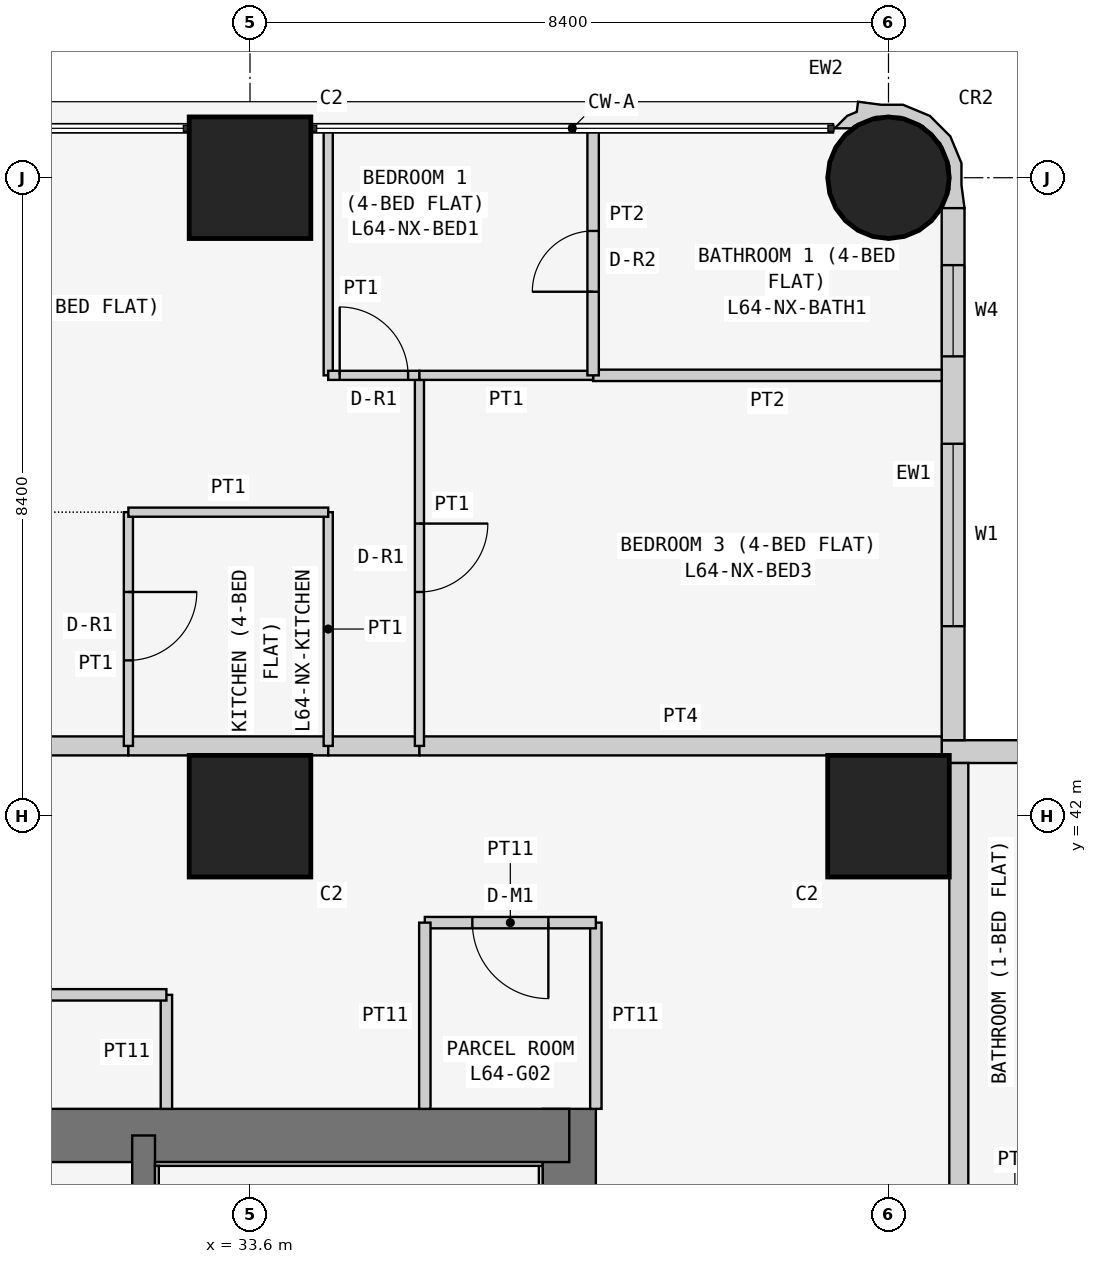
"""IFC4 building model, lengths in metres.
Left out: names, types, materials, properties, quantities, classifications, styles, units other than length and angle.
Written with IfcOpenShell. Run it as: python <this file> out.ifc"""

import sys

from ifc_helpers import new_model, si_unit, direction, frame, frame_2d, origin, origin_2d, place, context, subcontext, project, spatial, polyline, rectangle, circle, outline, extrude, element, fill, save


model = new_model("IFC4")
c1 = context("Model", 3, precision=1e-05, world=origin(), true_north=direction((0.0, 1.0)))
c2 = subcontext(c1, "Body", "Model", "MODEL_VIEW")
j1 = project(units=[si_unit("LENGTHUNIT", "METRE"), si_unit("PLANEANGLEUNIT", "RADIAN")], contexts=[c1])
p1 = place(None, origin())
s1 = spatial("IfcSite", under=j1, at=p1, CompositionType="ELEMENT")
p2 = place(p1, origin())
s2 = spatial("IfcBuilding", under=s1, at=p2, CompositionType="ELEMENT")
p3 = place(p2, frame((0.0, 0.0, 244.5)))
s3 = spatial("IfcBuildingStorey", under=s2, at=p3, CompositionType="ELEMENT", Elevation=244.5)
for number, where, z_axis, x_axis in (
    (1, (33.6, 42.0, 0.0), (0.0, 0.0, 1.0), (1.0, 0.0, 0.0)),
    (2, (33.6, 50.4, 0.0), (0.0, 0.0, 1.0), (1.0, 0.0, 0.0)),
    (3, (42.0, 42.0, 0.0), (0.0, 0.0, 1.0), (1.0, 0.0, 0.0)),
):
    element("IfcColumn", number, at=place(p3, frame(where, z_axis=z_axis, x_axis=x_axis)), inside=s3, PredefinedType="COLUMN", context=c2, shape_type="SweptSolid", body=[
        extrude(rectangle(XDim=1.6, YDim=1.6, at=origin_2d()), origin(), (0.0, 0.0, 1.0), 3.6),
    ])
p4 = place(p3, frame((42.0, 50.4, 0.0), z_axis=(0.0, 0.0, 1.0), x_axis=(1.0, 0.0, 0.0)))
e4 = element("IfcColumn", 4, at=p4, inside=s3, PredefinedType="COLUMN", context=c2, shape_type="SweptSolid", body=[
    extrude(circle(Radius=0.8, at=origin_2d()), origin(), (0.0, 0.0, 1.0), 3.6),
])
p5 = place(p3, frame((37.8, 21.0, 0.0), z_axis=(0.0, 0.0, 1.0), x_axis=(0.0, 1.0, 0.0)))
e5 = element("IfcWall", 5, at=p5, inside=s3, PredefinedType="SHEAR", context=c2, shape_type="SweptSolid", body=[
    extrude(rectangle(XDim=17.15, YDim=0.7, at=frame_2d((8.575, 0.0))), origin(), (0.0, 0.0, 1.0), 3.6),
])
p6 = place(p5, frame((5.2, 0.0, 0.0)))
e6 = element("IfcOpeningElement", 6, at=p6, cuts=e5, PredefinedType="OPENING", context=c2, shape_type="SweptSolid", body=[
    extrude(rectangle(XDim=1.2, YDim=2.1, at=frame_2d((0.6, 1.05))), frame((0.0, 0.36, 0.0), z_axis=(0.0, -1.0, 0.0), x_axis=(1.0, 0.0, 0.0)), (0.0, 0.0, 1.0), 0.72),
])
p7 = place(p3, frame((37.8, 37.8, 0.0), z_axis=(0.0, 0.0, 1.0), x_axis=(-1.0, 0.0, 0.0)))
e7 = element("IfcWall", 7, at=p7, inside=s3, PredefinedType="SHEAR", context=c2, shape_type="SweptSolid", body=[
    extrude(rectangle(XDim=17.15, YDim=0.7, at=frame_2d((8.575, 0.0))), origin(), (0.0, 0.0, 1.0), 3.6),
])
p8 = place(p3, frame((32.2, 29.25, 0.0), z_axis=(0.0, 0.0, 1.0), x_axis=(0.0, 1.0, 0.0)))
e8 = element("IfcWall", 8, at=p8, inside=s3, PredefinedType="SHEAR", context=c2, shape_type="SweptSolid", body=[
    extrude(rectangle(XDim=8.55, YDim=0.3, at=frame_2d((4.275, 0.0))), origin(), (0.0, 0.0, 1.0), 3.6),
])
p9 = place(p3, frame((50.0, 42.85, 0.0), z_axis=(0.0, 0.0, 1.0), x_axis=(-1.0, 0.0, 0.0)))
e9 = element("IfcWall", 9, at=p9, inside=s3, PredefinedType="SOLIDWALL", context=c2, shape_type="SweptSolid", body=[
    extrude(rectangle(XDim=7.3, YDim=0.3, at=frame_2d((3.65, 0.0))), origin(), (0.0, 0.0, 1.0), 3.35),
])
p10 = place(p9, frame((3.1, 0.0, 0.9)))
e10 = element("IfcOpeningElement", 10, at=p10, cuts=e9, PredefinedType="OPENING", context=c2, shape_type="SweptSolid", body=[
    extrude(rectangle(XDim=2.4, YDim=1.5, at=frame_2d((1.2, 0.75))), frame((0.0, 0.16, 0.0), z_axis=(0.0, -1.0, 0.0), x_axis=(1.0, 0.0, 0.0)), (0.0, 0.0, 1.0), 0.32),
])
p11 = place(p9, frame((0.75, 0.0, 0.9)))
e11 = element("IfcOpeningElement", 11, at=p11, cuts=e9, PredefinedType="OPENING", context=c2, shape_type="SweptSolid", body=[
    extrude(rectangle(XDim=1.2, YDim=1.5, at=frame_2d((0.6, 0.75))), frame((0.0, 0.16, 0.0), z_axis=(0.0, -1.0, 0.0), x_axis=(1.0, 0.0, 0.0)), (0.0, 0.0, 1.0), 0.32),
])
p12 = place(p3, frame((42.85, 43.0, 0.0), z_axis=(0.0, 0.0, 1.0), x_axis=(0.0, 1.0, 0.0)))
e12 = element("IfcWall", 12, at=p12, inside=s3, PredefinedType="SOLIDWALL", context=c2, shape_type="SweptSolid", body=[
    extrude(rectangle(XDim=7.0, YDim=0.3, at=frame_2d((3.5, 0.0))), origin(), (0.0, 0.0, 1.0), 3.35),
])
p13 = place(p12, frame((1.5, 0.0, 0.9)))
e13 = element("IfcOpeningElement", 13, at=p13, cuts=e12, PredefinedType="OPENING", context=c2, shape_type="SweptSolid", body=[
    extrude(rectangle(XDim=2.4, YDim=1.5, at=frame_2d((1.2, 0.75))), frame((0.0, 0.16, 0.0), z_axis=(0.0, -1.0, 0.0), x_axis=(1.0, 0.0, 0.0)), (0.0, 0.0, 1.0), 0.32),
])
p14 = place(p12, frame((5.05, 0.0, 0.9)))
e14 = element("IfcOpeningElement", 14, at=p14, cuts=e12, PredefinedType="OPENING", context=c2, shape_type="SweptSolid", body=[
    extrude(rectangle(XDim=1.2, YDim=1.5, at=frame_2d((0.6, 0.75))), frame((0.0, 0.16, 0.0), z_axis=(0.0, -1.0, 0.0), x_axis=(1.0, 0.0, 0.0)), (0.0, 0.0, 1.0), 0.32),
])
p15 = place(p3, frame((42.817, 50.073, 0.0), z_axis=(0.0, 0.0, 1.0), x_axis=(0.343276641956, 0.93923434088, 0.0)))
e15 = element("IfcWall", 15, at=p15, inside=s3, PredefinedType="SOLIDWALL", context=c2, shape_type="SweptSolid", body=[
    extrude(outline(polyline([(0.266, -0.055), (0.535, 0.044), (0.817, 0.302), (0.978, 0.648), (0.994, 1.03), (0.895, 1.3), (0.828, 1.598), (0.697, 1.569), (0.604, 1.67), (0.394, 1.767), (0.471, 1.556), (0.509, 1.539), (0.724, 1.304), (0.833, 1.005), (0.82, 0.687), (0.686, 0.397), (0.451, 0.182), (0.152, 0.073), (-0.116, 0.084), (-0.128, 0.078), (-0.146, 0.071), (-0.006, -0.197), (0.266, -0.055)])), origin(), (0.0, 0.0, 1.0), 3.35),
])
p16 = place(p3, frame((32.5, 38.15, 0.0), z_axis=(0.0, 0.0, 1.0), x_axis=(0.0, 1.0, 0.0)))
e16 = element("IfcWall", 16, at=p16, inside=s3, PredefinedType="PARTITIONING", context=c2, shape_type="SweptSolid", body=[
    extrude(rectangle(XDim=1.5, YDim=0.15, at=frame_2d((0.75, 0.0))), origin(), (0.0, 0.0, 1.0), 3.35),
])
p17 = place(p3, frame((32.5, 39.65, 0.0), z_axis=(0.0, 0.0, 1.0), x_axis=(-1.0, 0.0, 0.0)))
e17 = element("IfcWall", 17, at=p17, inside=s3, PredefinedType="PARTITIONING", context=c2, shape_type="SweptSolid", body=[
    extrude(rectangle(XDim=11.85, YDim=0.15, at=frame_2d((5.925, 0.0))), origin(), (0.0, 0.0, 1.0), 3.35),
])
p18 = place(p17, frame((2.6, 0.0, 0.0)))
e18 = element("IfcOpeningElement", 18, at=p18, cuts=e17, PredefinedType="OPENING", context=c2, shape_type="SweptSolid", body=[
    extrude(rectangle(XDim=1.0, YDim=2.1, at=frame_2d((0.5, 1.05))), frame((0.0, 0.085, 0.0), z_axis=(0.0, -1.0, 0.0), x_axis=(1.0, 0.0, 0.0)), (0.0, 0.0, 1.0), 0.17),
])
p19 = place(p3, frame((38.15, 38.15, 0.0), z_axis=(0.0, 0.0, 1.0), x_axis=(0.0, 1.0, 0.0)))
e19 = element("IfcWall", 19, at=p19, inside=s3, PredefinedType="PARTITIONING", context=c2, shape_type="SweptSolid", body=[
    extrude(rectangle(XDim=2.45, YDim=0.15, at=frame_2d((1.225, 0.0))), origin(), (0.0, 0.0, 1.0), 3.35),
])
p20 = place(p3, frame((38.15, 40.6, 0.0), z_axis=(0.0, 0.0, 1.0), x_axis=(-1.0, 0.0, 0.0)))
e20 = element("IfcWall", 20, at=p20, inside=s3, PredefinedType="PARTITIONING", context=c2, shape_type="SweptSolid", body=[
    extrude(rectangle(XDim=2.25, YDim=0.15, at=frame_2d((1.125, 0.0))), origin(), (0.0, 0.0, 1.0), 3.35),
])
p21 = place(p20, frame((0.625, 0.0, 0.0)))
e21 = element("IfcOpeningElement", 21, at=p21, cuts=e20, PredefinedType="OPENING", context=c2, shape_type="SweptSolid", body=[
    extrude(rectangle(XDim=1.0, YDim=2.1, at=frame_2d((0.5, 1.05))), frame((0.0, 0.085, 0.0), z_axis=(0.0, -1.0, 0.0), x_axis=(1.0, 0.0, 0.0)), (0.0, 0.0, 1.0), 0.17),
])
p22 = place(p3, frame((35.9, 40.6, 0.0), z_axis=(0.0, 0.0, 1.0), x_axis=(0.0, -1.0, 0.0)))
e22 = element("IfcWall", 22, at=p22, inside=s3, PredefinedType="PARTITIONING", context=c2, shape_type="SweptSolid", body=[
    extrude(rectangle(XDim=2.45, YDim=0.15, at=frame_2d((1.225, 0.0))), origin(), (0.0, 0.0, 1.0), 3.35),
])
p23 = place(p3, frame((26.8, 42.925, 0.0), z_axis=(0.0, 0.0, 1.0), x_axis=(1.0, 0.0, 0.0)))
e23 = element("IfcWall", 23, at=p23, inside=s3, PredefinedType="PARTITIONING", context=c2, shape_type="SweptSolid", body=[
    extrude(rectangle(XDim=5.2, YDim=0.25, at=frame_2d((2.6, 0.0))), origin(), (0.0, 0.0, 1.0), 3.35),
])
p24 = place(p23, frame((2.1, 0.0, 0.0)))
e24 = element("IfcOpeningElement", 24, at=p24, cuts=e23, PredefinedType="OPENING", context=c2, shape_type="SweptSolid", body=[
    extrude(rectangle(XDim=1.0, YDim=2.1, at=frame_2d((0.5, 1.05))), frame((0.0, 0.135, 0.0), z_axis=(0.0, -1.0, 0.0), x_axis=(1.0, 0.0, 0.0)), (0.0, 0.0, 1.0), 0.27),
])
p25 = place(p3, frame((32.0, 42.925, 0.0), z_axis=(0.0, 0.0, 1.0), x_axis=(1.0, 0.0, 0.0)))
e25 = element("IfcWall", 25, at=p25, inside=s3, PredefinedType="PARTITIONING", context=c2, shape_type="SweptSolid", body=[
    extrude(rectangle(XDim=2.629, YDim=0.25, at=frame_2d((1.314, 0.0))), origin(), (0.0, 0.0, 1.0), 3.35),
])
p26 = place(p3, frame((34.629, 42.925, 0.0), z_axis=(0.0, 0.0, 1.0), x_axis=(1.0, 0.0, 0.0)))
e26 = element("IfcWall", 26, at=p26, inside=s3, PredefinedType="PARTITIONING", context=c2, shape_type="SweptSolid", body=[
    extrude(rectangle(XDim=1.2, YDim=0.25, at=frame_2d((0.6, 0.0))), origin(), (0.0, 0.0, 1.0), 3.35),
])
p27 = place(p3, frame((35.829, 42.925, 0.0), z_axis=(0.0, 0.0, 1.0), x_axis=(1.0, 0.0, 0.0)))
e27 = element("IfcWall", 27, at=p27, inside=s3, PredefinedType="PARTITIONING", context=c2, shape_type="SweptSolid", body=[
    extrude(rectangle(XDim=6.871, YDim=0.25, at=frame_2d((3.436, 0.0))), origin(), (0.0, 0.0, 1.0), 3.35),
])
p28 = place(p3, frame((42.925, 42.7, 0.0), z_axis=(0.0, 0.0, 1.0), x_axis=(0.0, -1.0, 0.0)))
e28 = element("IfcWall", 28, at=p28, inside=s3, PredefinedType="PARTITIONING", context=c2, shape_type="SweptSolid", body=[
    extrude(rectangle(XDim=6.471, YDim=0.25, at=frame_2d((3.235, 0.0))), origin(), (0.0, 0.0, 1.0), 3.35),
])
p29 = place(p3, frame((32.0, 42.925, 0.0), z_axis=(0.0, 0.0, 1.0), x_axis=(0.0, 1.0, 0.0)))
e29 = element("IfcWall", 29, at=p29, inside=s3, PredefinedType="PARTITIONING", context=c2, shape_type="SweptSolid", body=[
    extrude(rectangle(XDim=3.075, YDim=0.12, at=frame_2d((1.538, 0.0))), origin(), (0.0, 0.0, 1.0), 3.35),
])
p30 = place(p29, frame((1.125, 0.0, 0.0)))
e30 = element("IfcOpeningElement", 30, at=p30, cuts=e29, PredefinedType="OPENING", context=c2, shape_type="SweptSolid", body=[
    extrude(rectangle(XDim=0.9, YDim=2.1, at=frame_2d((0.45, 1.05))), frame((0.0, 0.07, 0.0), z_axis=(0.0, -1.0, 0.0), x_axis=(1.0, 0.0, 0.0)), (0.0, 0.0, 1.0), 0.14),
])
p31 = place(p3, frame((34.629, 42.925, 0.0), z_axis=(0.0, 0.0, 1.0), x_axis=(0.0, 1.0, 0.0)))
e31 = element("IfcWall", 31, at=p31, inside=s3, PredefinedType="PARTITIONING", context=c2, shape_type="SweptSolid", body=[
    extrude(rectangle(XDim=3.075, YDim=0.12, at=frame_2d((1.538, 0.0))), origin(), (0.0, 0.0, 1.0), 3.35),
])
p32 = place(p3, frame((34.629, 46.0, 0.0), z_axis=(0.0, 0.0, 1.0), x_axis=(-1.0, 0.0, 0.0)))
e32 = element("IfcWall", 32, at=p32, inside=s3, PredefinedType="PARTITIONING", context=c2, shape_type="SweptSolid", body=[
    extrude(rectangle(XDim=2.629, YDim=0.12, at=frame_2d((1.314, 0.0))), origin(), (0.0, 0.0, 1.0), 3.35),
])
p33 = place(p3, frame((35.829, 47.8, 0.0), z_axis=(0.0, 0.0, 1.0), x_axis=(0.0, -1.0, 0.0)))
e33 = element("IfcWall", 33, at=p33, inside=s3, PredefinedType="PARTITIONING", context=c2, shape_type="SweptSolid", body=[
    extrude(rectangle(XDim=4.875, YDim=0.12, at=frame_2d((2.438, 0.0))), origin(), (0.0, 0.0, 1.0), 3.35),
])
p34 = place(p33, frame((1.95, 0.0, 0.0)))
e34 = element("IfcOpeningElement", 34, at=p34, cuts=e33, PredefinedType="OPENING", context=c2, shape_type="SweptSolid", body=[
    extrude(rectangle(XDim=0.9, YDim=2.1, at=frame_2d((0.45, 1.05))), frame((0.0, 0.07, 0.0), z_axis=(0.0, -1.0, 0.0), x_axis=(1.0, 0.0, 0.0)), (0.0, 0.0, 1.0), 0.14),
])
p35 = place(p3, frame((34.629, 51.05, 0.0), z_axis=(0.0, 0.0, 1.0), x_axis=(0.0, -1.0, 0.0)))
e35 = element("IfcWall", 35, at=p35, inside=s3, PredefinedType="PARTITIONING", context=c2, shape_type="SweptSolid", body=[
    extrude(rectangle(XDim=3.25, YDim=0.12, at=frame_2d((1.625, 0.0))), origin(), (0.0, 0.0, 1.0), 3.35),
])
p36 = place(p3, frame((34.629, 47.8, 0.0), z_axis=(0.0, 0.0, 1.0), x_axis=(1.0, 0.0, 0.0)))
e36 = element("IfcWall", 36, at=p36, inside=s3, PredefinedType="PARTITIONING", context=c2, shape_type="SweptSolid", body=[
    extrude(rectangle(XDim=1.2, YDim=0.12, at=frame_2d((0.6, 0.0))), origin(), (0.0, 0.0, 1.0), 3.35),
])
p37 = place(p36, frame((0.151, 0.0, 0.0)))
e37 = element("IfcOpeningElement", 37, at=p37, cuts=e36, PredefinedType="OPENING", context=c2, shape_type="SweptSolid", body=[
    extrude(rectangle(XDim=0.9, YDim=2.1, at=frame_2d((0.45, 1.05))), frame((0.0, 0.07, 0.0), z_axis=(0.0, -1.0, 0.0), x_axis=(1.0, 0.0, 0.0)), (0.0, 0.0, 1.0), 0.14),
])
p38 = place(p3, frame((42.7, 47.8, 0.0), z_axis=(0.0, 0.0, 1.0), x_axis=(-1.0, 0.0, 0.0)))
e38 = element("IfcWall", 38, at=p38, inside=s3, PredefinedType="PARTITIONING", context=c2, shape_type="SweptSolid", body=[
    extrude(rectangle(XDim=4.586, YDim=0.15, at=frame_2d((2.293, 0.0))), origin(), (0.0, 0.0, 1.0), 3.35),
])
p39 = place(p3, frame((38.114, 47.8, 0.0), z_axis=(0.0, 0.0, 1.0), x_axis=(-1.0, 0.0, 0.0)))
e39 = element("IfcWall", 39, at=p39, inside=s3, PredefinedType="PARTITIONING", context=c2, shape_type="SweptSolid", body=[
    extrude(rectangle(XDim=2.285, YDim=0.12, at=frame_2d((1.143, 0.0))), origin(), (0.0, 0.0, 1.0), 3.35),
])
p40 = place(p3, frame((38.114, 51.05, 0.0), z_axis=(0.0, 0.0, 1.0), x_axis=(0.0, -1.0, 0.0)))
e40 = element("IfcWall", 40, at=p40, inside=s3, PredefinedType="PARTITIONING", context=c2, shape_type="SweptSolid", body=[
    extrude(rectangle(XDim=3.25, YDim=0.15, at=frame_2d((1.625, 0.0))), origin(), (0.0, 0.0, 1.0), 3.35),
])
p41 = place(p40, frame((1.35, 0.0, 0.0)))
e41 = element("IfcOpeningElement", 41, at=p41, cuts=e40, PredefinedType="OPENING", context=c2, shape_type="SweptSolid", body=[
    extrude(rectangle(XDim=0.8, YDim=2.1, at=frame_2d((0.4, 1.05))), frame((0.0, 0.085, 0.0), z_axis=(0.0, -1.0, 0.0), x_axis=(1.0, 0.0, 0.0)), (0.0, 0.0, 1.0), 0.17),
])
p42 = place(p3, frame((32.35, 37.425, 1.8), z_axis=(0.0, 0.0, 1.0), x_axis=(1.0, 0.0, 0.0)))
e42 = element("IfcWall", 42, at=p42, inside=s3, PredefinedType="PARTITIONING", context=c2, shape_type="SweptSolid", body=[
    extrude(rectangle(XDim=5.1, YDim=0.05, at=frame_2d((2.55, 0.0))), origin(), (0.0, 0.0, 1.0), 1.8),
])
for number, where, z_axis, x_axis in (
    (43, (32.375, 33.47, 1.8), (0.0, 0.0, 1.0), (0.0, 1.0, 0.0)),
    (44, (37.425, 33.47, 1.8), (0.0, 0.0, 1.0), (0.0, 1.0, 0.0)),
):
    element("IfcWall", number, at=place(p3, frame(where, z_axis=z_axis, x_axis=x_axis)), inside=s3, PredefinedType="PARTITIONING", context=c2, shape_type="SweptSolid", body=[
        extrude(rectangle(XDim=3.93, YDim=0.05, at=frame_2d((1.965, 0.0))), origin(), (0.0, 0.0, 1.0), 1.8),
    ])
p43 = place(p13, origin())
e45 = element("IfcWindow", 45, at=p43, inside=s3, PartitioningType="SINGLE_PANEL", PredefinedType="WINDOW", context=c2, shape_type="SweptSolid", body=[
    extrude(rectangle(XDim=2.4, YDim=1.5, at=frame_2d((1.2, 0.75))), frame((0.0, 0.03, 0.0), z_axis=(0.0, -1.0, 0.0), x_axis=(1.0, 0.0, 0.0)), (0.0, 0.0, 1.0), 0.06),
])
fill(e13, e45)
p44 = place(p14, origin())
e46 = element("IfcWindow", 46, at=p44, inside=s3, PartitioningType="SINGLE_PANEL", PredefinedType="WINDOW", context=c2, shape_type="SweptSolid", body=[
    extrude(rectangle(XDim=1.2, YDim=1.5, at=frame_2d((0.6, 0.75))), frame((0.0, 0.03, 0.0), z_axis=(0.0, -1.0, 0.0), x_axis=(1.0, 0.0, 0.0)), (0.0, 0.0, 1.0), 0.06),
])
fill(e14, e46)
p45 = place(p21, origin())
e47 = element("IfcDoor", 47, at=p45, inside=s3, OperationType="SINGLE_SWING_LEFT", PredefinedType="DOOR", context=c2, shape_type="SweptSolid", body=[
    extrude(rectangle(XDim=1.0, YDim=2.1, at=frame_2d((0.5, 1.05))), frame((0.0, 0.025, 0.0), z_axis=(0.0, -1.0, 0.0), x_axis=(1.0, 0.0, 0.0)), (0.0, 0.0, 1.0), 0.05),
])
fill(e21, e47)
p46 = place(p30, frame((0.9, 0.0, 0.0), z_axis=(0.0, 0.0, 1.0), x_axis=(-1.0, 0.0, 0.0)))
e48 = element("IfcDoor", 48, at=p46, inside=s3, OperationType="SINGLE_SWING_LEFT", PredefinedType="DOOR", context=c2, shape_type="SweptSolid", body=[
    extrude(rectangle(XDim=0.9, YDim=2.1, at=frame_2d((0.45, 1.05))), frame((0.0, 0.025, 0.0), z_axis=(0.0, -1.0, 0.0), x_axis=(1.0, 0.0, 0.0)), (0.0, 0.0, 1.0), 0.05),
])
fill(e30, e48)
p47 = place(p34, origin())
e49 = element("IfcDoor", 49, at=p47, inside=s3, OperationType="SINGLE_SWING_LEFT", PredefinedType="DOOR", context=c2, shape_type="SweptSolid", body=[
    extrude(rectangle(XDim=0.9, YDim=2.1, at=frame_2d((0.45, 1.05))), frame((0.0, 0.025, 0.0), z_axis=(0.0, -1.0, 0.0), x_axis=(1.0, 0.0, 0.0)), (0.0, 0.0, 1.0), 0.05),
])
fill(e34, e49)
p48 = place(p37, origin())
e50 = element("IfcDoor", 50, at=p48, inside=s3, OperationType="SINGLE_SWING_LEFT", PredefinedType="DOOR", context=c2, shape_type="SweptSolid", body=[
    extrude(rectangle(XDim=0.9, YDim=2.1, at=frame_2d((0.45, 1.05))), frame((0.0, 0.025, 0.0), z_axis=(0.0, -1.0, 0.0), x_axis=(1.0, 0.0, 0.0)), (0.0, 0.0, 1.0), 0.05),
])
fill(e37, e50)
p49 = place(p41, frame((0.8, 0.0, 0.0), z_axis=(0.0, 0.0, 1.0), x_axis=(-1.0, 0.0, 0.0)))
e51 = element("IfcDoor", 51, at=p49, inside=s3, OperationType="SINGLE_SWING_LEFT", PredefinedType="DOOR", context=c2, shape_type="SweptSolid", body=[
    extrude(rectangle(XDim=0.8, YDim=2.1, at=frame_2d((0.4, 1.05))), frame((0.0, 0.025, 0.0), z_axis=(0.0, -1.0, 0.0), x_axis=(1.0, 0.0, 0.0)), (0.0, 0.0, 1.0), 0.05),
])
fill(e41, e51)
save(model, sys.argv[1])
